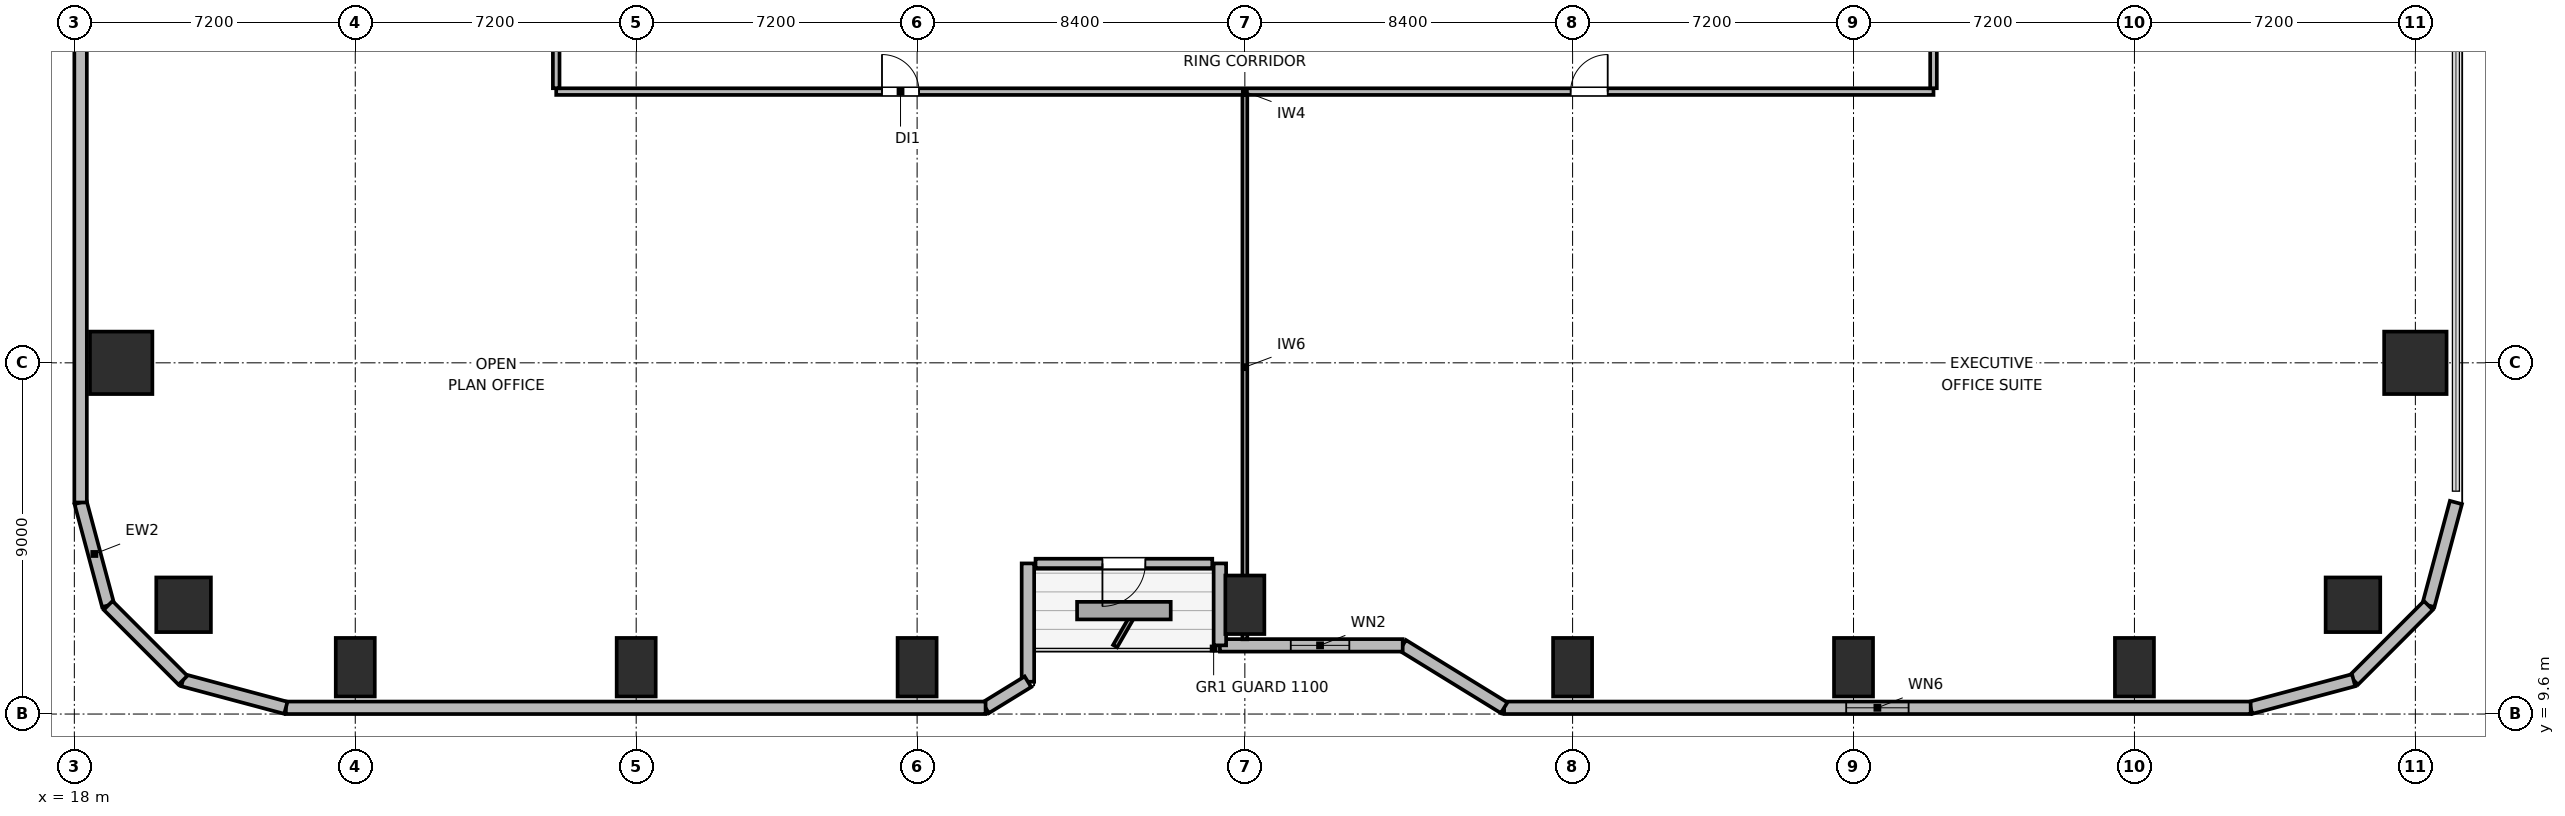
"""IFC4 building model, lengths in metres.
Left out: names, types, materials, properties, quantities, classifications, styles, units other than length and angle.
Written with IfcOpenShell. Run it as: python <this file> out.ifc"""

import sys

from ifc_helpers import new_model, si_unit, direction, frame, frame_2d, origin, origin_2d, place, context, subcontext, project, spatial, rectangle, circle, extrude, element, fill, save


model = new_model("IFC4")
c1 = context("Model", 3, precision=1e-05, world=origin(), true_north=direction((0.0, 1.0)))
c2 = subcontext(c1, "Body", "Model", "MODEL_VIEW")
j1 = project(units=[si_unit("LENGTHUNIT", "METRE"), si_unit("PLANEANGLEUNIT", "RADIAN")], contexts=[c1])
p1 = place(None, origin())
s1 = spatial("IfcSite", under=j1, at=p1, CompositionType="ELEMENT")
p2 = place(p1, origin())
s2 = spatial("IfcBuilding", under=s1, at=p2, CompositionType="ELEMENT")
p3 = place(p2, frame((0.0, 0.0, 25.5)))
s3 = spatial("IfcBuildingStorey", under=s2, at=p3, CompositionType="ELEMENT", Elevation=25.5)
for number, where, z_axis, x_axis in (
    (1, (20.8, 12.4, 0.0), (0.0, 0.0, 1.0), (1.0, 0.0, 0.0)),
    (2, (76.4, 12.4, 0.0), (0.0, 0.0, 1.0), (1.0, 0.0, 0.0)),
):
    element("IfcColumn", number, at=place(p3, frame(where, z_axis=z_axis, x_axis=x_axis)), inside=s3, PredefinedType="COLUMN", context=c2, shape_type="SweptSolid", body=[
        extrude(circle(Radius=0.7, at=origin_2d()), origin(), (0.0, 0.0, 1.0), 3.9),
    ])
for number, where, z_axis, x_axis in (
    (3, (25.2, 10.8, 0.0), (0.0, 0.0, 1.0), (1.0, 0.0, 0.0)),
    (4, (32.4, 10.8, 0.0), (0.0, 0.0, 1.0), (1.0, 0.0, 0.0)),
    (5, (39.6, 10.8, 0.0), (0.0, 0.0, 1.0), (1.0, 0.0, 0.0)),
    (6, (48.0, 12.4, 0.0), (0.0, 0.0, 1.0), (1.0, 0.0, 0.0)),
    (7, (56.4, 10.8, 0.0), (0.0, 0.0, 1.0), (1.0, 0.0, 0.0)),
    (8, (63.6, 10.8, 0.0), (0.0, 0.0, 1.0), (1.0, 0.0, 0.0)),
    (9, (70.8, 10.8, 0.0), (0.0, 0.0, 1.0), (1.0, 0.0, 0.0)),
):
    element("IfcColumn", number, at=place(p3, frame(where, z_axis=z_axis, x_axis=x_axis)), inside=s3, PredefinedType="COLUMN", context=c2, shape_type="SweptSolid", body=[
        extrude(rectangle(XDim=1.0, YDim=1.5, at=origin_2d()), origin(), (0.0, 0.0, 1.0), 3.9),
    ])
for number, where, z_axis, x_axis in (
    (10, (19.2, 18.6, 0.0), (0.0, 0.0, 1.0), (1.0, 0.0, 0.0)),
    (11, (78.0, 18.6, 0.0), (0.0, 0.0, 1.0), (1.0, 0.0, 0.0)),
):
    element("IfcColumn", number, at=place(p3, frame(where, z_axis=z_axis, x_axis=x_axis)), inside=s3, PredefinedType="COLUMN", context=c2, shape_type="SweptSolid", body=[
        extrude(rectangle(XDim=1.6, YDim=1.6, at=origin_2d()), origin(), (0.0, 0.0, 1.0), 3.9),
    ])
p4 = place(p3, frame((18.866, 12.383, 0.0), z_axis=(0.0, 0.0, 1.0), x_axis=(-0.25869736047, 0.965958423373, 0.0)))
e12 = element("IfcWall", 12, at=p4, inside=s3, PredefinedType="SOLIDWALL", context=c2, shape_type="SweptSolid", body=[
    extrude(rectangle(XDim=2.731, YDim=0.32, at=frame_2d((1.366, 0.0))), origin(), (0.0, 0.0, 1.0), 3.64),
])
p5 = place(p3, frame((18.16, 15.021, 0.0), z_axis=(0.0, 0.0, 1.0), x_axis=(0.0, 1.0, 0.0)))
e13 = element("IfcWall", 13, at=p5, inside=s3, PredefinedType="SOLIDWALL", context=c2, shape_type="SweptSolid", body=[
    extrude(rectangle(XDim=14.219, YDim=0.32, at=frame_2d((7.109, 0.0))), origin(), (0.0, 0.0, 1.0), 3.64),
])
p6 = place(p3, frame((79.04, 15.021, 0.0), z_axis=(0.0, 0.0, 1.0), x_axis=(-0.25869736047, -0.965958423373, 0.0)))
e14 = element("IfcWall", 14, at=p6, inside=s3, PredefinedType="SOLIDWALL", context=c2, shape_type="SweptSolid", body=[
    extrude(rectangle(XDim=2.731, YDim=0.32, at=frame_2d((1.366, 0.0))), origin(), (0.0, 0.0, 1.0), 3.64),
])
p7 = place(p3, frame((78.333, 12.383, 0.0), z_axis=(0.0, 0.0, 1.0), x_axis=(-0.707106781187, -0.707106781187, 0.0)))
e15 = element("IfcWall", 15, at=p7, inside=s3, PredefinedType="SOLIDWALL", context=c2, shape_type="SweptSolid", body=[
    extrude(rectangle(XDim=2.71, YDim=0.32, at=frame_2d((1.355, 0.0))), origin(), (0.0, 0.0, 1.0), 3.64),
])
p8 = place(p3, frame((76.417, 10.467, 0.0), z_axis=(0.0, 0.0, 1.0), x_axis=(-0.965964405026, -0.25867502435, 0.0)))
e16 = element("IfcWall", 16, at=p8, inside=s3, PredefinedType="SOLIDWALL", context=c2, shape_type="SweptSolid", body=[
    extrude(rectangle(XDim=2.731, YDim=0.32, at=frame_2d((1.366, 0.0))), origin(), (0.0, 0.0, 1.0), 3.64),
])
p9 = place(p3, frame((73.779, 9.76, 0.0), z_axis=(0.0, 0.0, 1.0), x_axis=(-1.0, 0.0, 0.0)))
e17 = element("IfcWall", 17, at=p9, inside=s3, PredefinedType="SOLIDWALL", context=c2, shape_type="SweptSolid", body=[
    extrude(rectangle(XDim=19.134, YDim=0.32, at=frame_2d((9.567, 0.0))), origin(), (0.0, 0.0, 1.0), 3.64),
])
p10 = place(p9, frame((8.767, 0.0, 0.85)))
e18 = element("IfcOpeningElement", 18, at=p10, cuts=e17, PredefinedType="OPENING", context=c2, shape_type="SweptSolid", body=[
    extrude(rectangle(XDim=1.6, YDim=1.0, at=frame_2d((0.8, 0.5))), frame((0.0, 0.17, 0.0), z_axis=(0.0, -1.0, 0.0), x_axis=(1.0, 0.0, 0.0)), (0.0, 0.0, 1.0), 0.34),
])
p11 = place(p3, frame((54.645, 9.76, 0.0), z_axis=(0.0, 0.0, 1.0), x_axis=(-0.851630857047, 0.524142044989, 0.0)))
e19 = element("IfcWall", 19, at=p11, inside=s3, PredefinedType="SOLIDWALL", context=c2, shape_type="SweptSolid", body=[
    extrude(rectangle(XDim=3.053, YDim=0.32, at=frame_2d((1.526, 0.0))), origin(), (0.0, 0.0, 1.0), 2.875),
])
p12 = place(p3, frame((52.045, 11.36, 0.0), z_axis=(0.0, 0.0, 1.0), x_axis=(-1.0, 0.0, 0.0)))
e20 = element("IfcWall", 20, at=p12, inside=s3, PredefinedType="SOLIDWALL", context=c2, shape_type="SweptSolid", body=[
    extrude(rectangle(XDim=4.685, YDim=0.32, at=frame_2d((2.343, 0.0))), origin(), (0.0, 0.0, 1.0), 2.875),
])
p13 = place(p12, frame((1.368, 0.0, 0.85)))
e21 = element("IfcOpeningElement", 21, at=p13, cuts=e20, PredefinedType="OPENING", context=c2, shape_type="SweptSolid", body=[
    extrude(rectangle(XDim=1.5, YDim=1.1, at=frame_2d((0.75, 0.55))), frame((0.0, 0.17, 0.0), z_axis=(0.0, -1.0, 0.0), x_axis=(1.0, 0.0, 0.0)), (0.0, 0.0, 1.0), 0.34),
])
p14 = place(p3, frame((47.36, 11.36, 0.0), z_axis=(0.0, 0.0, 1.0), x_axis=(0.0, 1.0, 0.0)))
e22 = element("IfcWall", 22, at=p14, inside=s3, PredefinedType="SOLIDWALL", context=c2, shape_type="SweptSolid", body=[
    extrude(rectangle(XDim=2.1, YDim=0.32, at=frame_2d((1.05, 0.0))), origin(), (0.0, 0.0, 1.0), 2.875),
])
p15 = place(p3, frame((47.165, 13.46, 0.0), z_axis=(0.0, 0.0, 1.0), x_axis=(-1.0, 0.0, 0.0)))
e23 = element("IfcWall", 23, at=p15, inside=s3, PredefinedType="SOLIDWALL", context=c2, shape_type="SweptSolid", body=[
    extrude(rectangle(XDim=4.53, YDim=0.24, at=frame_2d((2.265, 0.0))), origin(), (0.0, 0.0, 1.0), 3.64),
])
p16 = place(p15, frame((1.715, 0.0, 0.0)))
e24 = element("IfcOpeningElement", 24, at=p16, cuts=e23, PredefinedType="OPENING", context=c2, shape_type="SweptSolid", body=[
    extrude(rectangle(XDim=1.1, YDim=2.04, at=frame_2d((0.55, 1.02))), frame((0.0, 0.13, 0.0), z_axis=(0.0, -1.0, 0.0), x_axis=(1.0, 0.0, 0.0)), (0.0, 0.0, 1.0), 0.26),
])
p17 = place(p3, frame((42.44, 13.46, 0.0), z_axis=(0.0, 0.0, 1.0), x_axis=(0.0, -1.0, 0.0)))
e25 = element("IfcWall", 25, at=p17, inside=s3, PredefinedType="SOLIDWALL", context=c2, shape_type="SweptSolid", body=[
    extrude(rectangle(XDim=3.032, YDim=0.32, at=frame_2d((1.516, 0.0))), origin(), (0.0, 0.0, 1.0), 2.875),
])
p18 = place(p3, frame((42.44, 10.427, 0.0), z_axis=(0.0, 0.0, 1.0), x_axis=(-0.851776724646, -0.523904964045, 0.0)))
e26 = element("IfcWall", 26, at=p18, inside=s3, PredefinedType="SOLIDWALL", context=c2, shape_type="SweptSolid", body=[
    extrude(rectangle(XDim=1.274, YDim=0.32, at=frame_2d((0.637, 0.0))), origin(), (0.0, 0.0, 1.0), 3.64),
])
p19 = place(p3, frame((41.355, 9.76, 0.0), z_axis=(0.0, 0.0, 1.0), x_axis=(-1.0, 0.0, 0.0)))
e27 = element("IfcWall", 27, at=p19, inside=s3, PredefinedType="SOLIDWALL", context=c2, shape_type="SweptSolid", body=[
    extrude(rectangle(XDim=17.934, YDim=0.32, at=frame_2d((8.967, 0.0))), origin(), (0.0, 0.0, 1.0), 3.64),
])
p20 = place(p3, frame((23.421, 9.76, 0.0), z_axis=(0.0, 0.0, 1.0), x_axis=(-0.965964405026, 0.25867502435, 0.0)))
e28 = element("IfcWall", 28, at=p20, inside=s3, PredefinedType="SOLIDWALL", context=c2, shape_type="SweptSolid", body=[
    extrude(rectangle(XDim=2.731, YDim=0.32, at=frame_2d((1.366, 0.0))), origin(), (0.0, 0.0, 1.0), 3.64),
])
p21 = place(p3, frame((20.783, 10.467, 0.0), z_axis=(0.0, 0.0, 1.0), x_axis=(-0.707106781187, 0.707106781187, 0.0)))
e29 = element("IfcWall", 29, at=p21, inside=s3, PredefinedType="SOLIDWALL", context=c2, shape_type="SweptSolid", body=[
    extrude(rectangle(XDim=2.71, YDim=0.32, at=frame_2d((1.355, 0.0))), origin(), (0.0, 0.0, 1.0), 3.64),
])
p22 = place(p3, frame((30.35, 25.55, 0.0), z_axis=(0.0, 0.0, 1.0), x_axis=(1.0, 0.0, 0.0)))
e30 = element("IfcWall", 30, at=p22, inside=s3, PredefinedType="PARTITIONING", context=c2, shape_type="SweptSolid", body=[
    extrude(rectangle(XDim=35.3, YDim=0.17, at=frame_2d((17.65, 0.0))), origin(), (0.0, 0.0, 1.0), 3.64),
])
p23 = place(p22, frame((8.35, 0.0, 0.0)))
e31 = element("IfcOpeningElement", 31, at=p23, cuts=e30, PredefinedType="OPENING", context=c2, shape_type="SweptSolid", body=[
    extrude(rectangle(XDim=0.95, YDim=2.04, at=frame_2d((0.475, 1.02))), frame((0.0, 0.095, 0.0), z_axis=(0.0, -1.0, 0.0), x_axis=(1.0, 0.0, 0.0)), (0.0, 0.0, 1.0), 0.19),
])
p24 = place(p22, frame((26.0, 0.0, 0.0)))
e32 = element("IfcOpeningElement", 32, at=p24, cuts=e30, PredefinedType="OPENING", context=c2, shape_type="SweptSolid", body=[
    extrude(rectangle(XDim=0.95, YDim=2.04, at=frame_2d((0.475, 1.02))), frame((0.0, 0.095, 0.0), z_axis=(0.0, -1.0, 0.0), x_axis=(1.0, 0.0, 0.0)), (0.0, 0.0, 1.0), 0.19),
])
p25 = place(p3, frame((30.35, 25.637, 0.0), z_axis=(0.0, 0.0, 1.0), x_axis=(0.0, 1.0, 0.0)))
e33 = element("IfcWall", 33, at=p25, inside=s3, PredefinedType="PARTITIONING", context=c2, shape_type="SweptSolid", body=[
    extrude(rectangle(XDim=20.726, YDim=0.17, at=frame_2d((10.363, 0.0))), origin(), (0.0, 0.0, 1.0), 3.64),
])
p26 = place(p25, frame((4.263, 0.0, 0.0)))
e34 = element("IfcOpeningElement", 34, at=p26, cuts=e33, PredefinedType="OPENING", context=c2, shape_type="SweptSolid", body=[
    extrude(rectangle(XDim=0.95, YDim=2.04, at=frame_2d((0.475, 1.02))), frame((0.0, 0.095, 0.0), z_axis=(0.0, -1.0, 0.0), x_axis=(1.0, 0.0, 0.0)), (0.0, 0.0, 1.0), 0.19),
])
p27 = place(p25, frame((14.713, 0.0, 0.0)))
e35 = element("IfcOpeningElement", 35, at=p27, cuts=e33, PredefinedType="OPENING", context=c2, shape_type="SweptSolid", body=[
    extrude(rectangle(XDim=0.95, YDim=2.04, at=frame_2d((0.475, 1.02))), frame((0.0, 0.095, 0.0), z_axis=(0.0, -1.0, 0.0), x_axis=(1.0, 0.0, 0.0)), (0.0, 0.0, 1.0), 0.19),
])
p28 = place(p3, frame((65.65, 25.637, 0.0), z_axis=(0.0, 0.0, 1.0), x_axis=(0.0, 1.0, 0.0)))
e36 = element("IfcWall", 36, at=p28, inside=s3, PredefinedType="PARTITIONING", context=c2, shape_type="SweptSolid", body=[
    extrude(rectangle(XDim=20.726, YDim=0.17, at=frame_2d((10.363, 0.0))), origin(), (0.0, 0.0, 1.0), 3.64),
])
p29 = place(p28, frame((4.163, 0.0, 0.0)))
e37 = element("IfcOpeningElement", 37, at=p29, cuts=e36, PredefinedType="OPENING", context=c2, shape_type="SweptSolid", body=[
    extrude(rectangle(XDim=0.95, YDim=2.04, at=frame_2d((0.475, 1.02))), frame((0.0, 0.095, 0.0), z_axis=(0.0, -1.0, 0.0), x_axis=(1.0, 0.0, 0.0)), (0.0, 0.0, 1.0), 0.19),
])
p30 = place(p28, frame((14.613, 0.0, 0.0)))
e38 = element("IfcOpeningElement", 38, at=p30, cuts=e36, PredefinedType="OPENING", context=c2, shape_type="SweptSolid", body=[
    extrude(rectangle(XDim=0.95, YDim=2.04, at=frame_2d((0.475, 1.02))), frame((0.0, 0.095, 0.0), z_axis=(0.0, -1.0, 0.0), x_axis=(1.0, 0.0, 0.0)), (0.0, 0.0, 1.0), 0.19),
])
p31 = place(p3, frame((48.0, 11.515, 0.0), z_axis=(0.0, 0.0, 1.0), x_axis=(0.0, 1.0, 0.0)))
e39 = element("IfcWall", 39, at=p31, inside=s3, PredefinedType="PARTITIONING", context=c2, shape_type="SweptSolid", body=[
    extrude(rectangle(XDim=13.948, YDim=0.125, at=frame_2d((6.974, 0.0))), origin(), (0.0, 0.0, 1.0), 2.93),
])
p32 = place(p10, origin())
e40 = element("IfcWindow", 40, at=p32, inside=s3, PartitioningType="SINGLE_PANEL", PredefinedType="WINDOW", context=c2, shape_type="SweptSolid", body=[
    extrude(rectangle(XDim=1.6, YDim=1.0, at=frame_2d((0.8, 0.5))), frame((0.0, 0.03, 0.0), z_axis=(0.0, -1.0, 0.0), x_axis=(1.0, 0.0, 0.0)), (0.0, 0.0, 1.0), 0.06),
])
fill(e18, e40)
p33 = place(p13, origin())
e41 = element("IfcWindow", 41, at=p33, inside=s3, PartitioningType="SINGLE_PANEL", PredefinedType="WINDOW", context=c2, shape_type="SweptSolid", body=[
    extrude(rectangle(XDim=1.5, YDim=1.1, at=frame_2d((0.75, 0.55))), frame((0.0, 0.03, 0.0), z_axis=(0.0, -1.0, 0.0), x_axis=(1.0, 0.0, 0.0)), (0.0, 0.0, 1.0), 0.06),
])
fill(e21, e41)
p34 = place(p16, origin())
e42 = element("IfcDoor", 42, at=p34, inside=s3, OperationType="SINGLE_SWING_RIGHT", PredefinedType="DOOR", context=c2, shape_type="SweptSolid", body=[
    extrude(rectangle(XDim=1.1, YDim=2.04, at=frame_2d((0.55, 1.02))), frame((0.0, 0.025, 0.0), z_axis=(0.0, -1.0, 0.0), x_axis=(1.0, 0.0, 0.0)), (0.0, 0.0, 1.0), 0.05),
])
fill(e24, e42)
p35 = place(p23, origin())
e43 = element("IfcDoor", 43, at=p35, inside=s3, OperationType="SINGLE_SWING_LEFT", PredefinedType="DOOR", context=c2, shape_type="SweptSolid", body=[
    extrude(rectangle(XDim=0.95, YDim=2.04, at=frame_2d((0.475, 1.02))), frame((0.0, 0.025, 0.0), z_axis=(0.0, -1.0, 0.0), x_axis=(1.0, 0.0, 0.0)), (0.0, 0.0, 1.0), 0.05),
])
fill(e31, e43)
p36 = place(p24, origin())
e44 = element("IfcDoor", 44, at=p36, inside=s3, OperationType="SINGLE_SWING_RIGHT", PredefinedType="DOOR", context=c2, shape_type="SweptSolid", body=[
    extrude(rectangle(XDim=0.95, YDim=2.04, at=frame_2d((0.475, 1.02))), frame((0.0, 0.025, 0.0), z_axis=(0.0, -1.0, 0.0), x_axis=(1.0, 0.0, 0.0)), (0.0, 0.0, 1.0), 0.05),
])
fill(e32, e44)
save(model, sys.argv[1])
